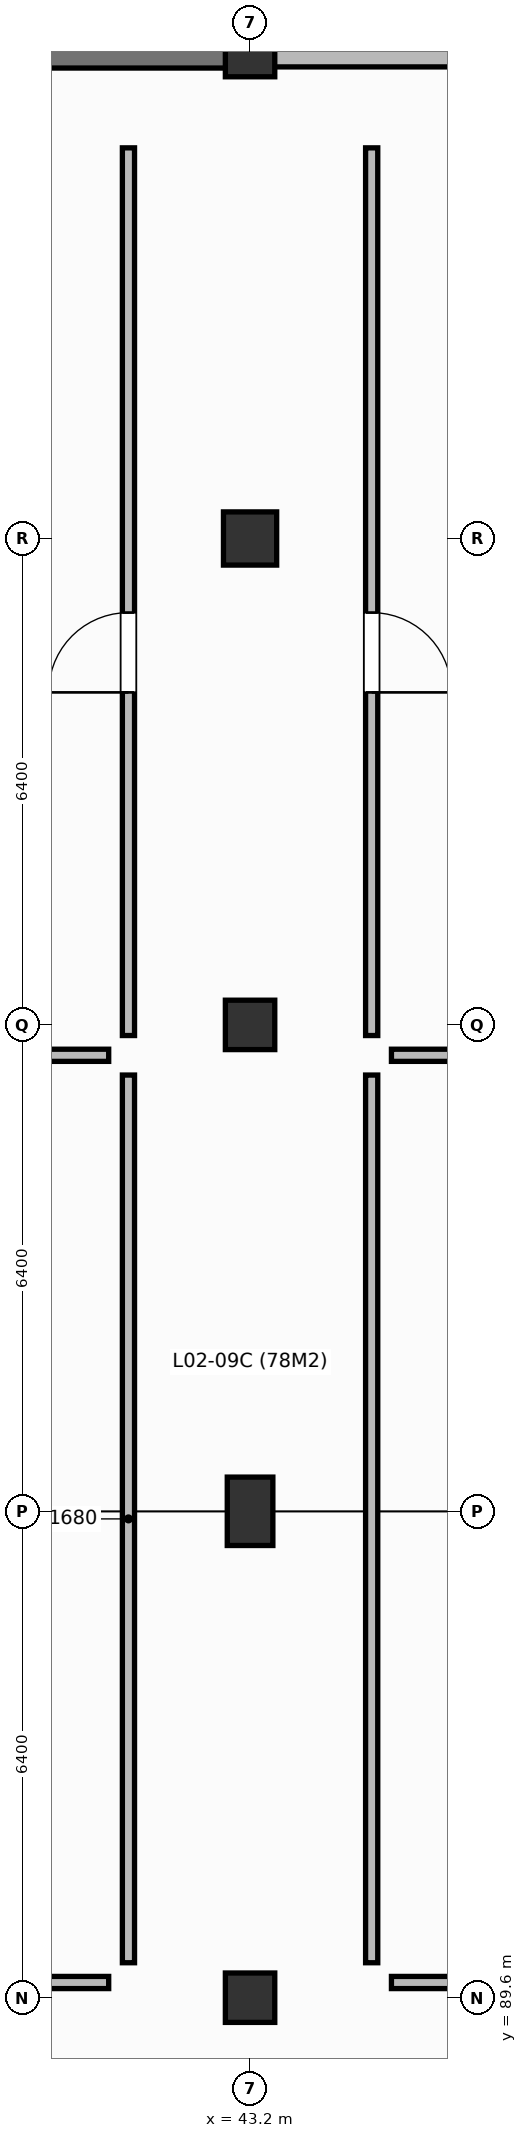
"""IFC4 building model, lengths in metres.
Left out: names, types, materials, properties, quantities, classifications, styles, units other than length and angle.
Written with IfcOpenShell. Run it as: python <this file> out.ifc"""

import sys

from ifc_helpers import new_model, si_unit, direction, frame, frame_2d, origin, origin_2d, place, context, subcontext, project, spatial, rectangle, extrude, element, fill, save


model = new_model("IFC4")
c1 = context("Model", 3, precision=1e-05, world=origin(), true_north=direction((0.0, 1.0)))
c2 = subcontext(c1, "Body", "Model", "MODEL_VIEW")
j1 = project(units=[si_unit("LENGTHUNIT", "METRE"), si_unit("PLANEANGLEUNIT", "RADIAN")], contexts=[c1])
p1 = place(None, origin())
s1 = spatial("IfcSite", under=j1, at=p1, CompositionType="ELEMENT")
p2 = place(p1, origin())
s2 = spatial("IfcBuilding", under=s1, at=p2, CompositionType="ELEMENT")
p3 = place(p2, frame((0.0, 0.0, 9.0)))
s3 = spatial("IfcBuildingStorey", under=s2, at=p3, CompositionType="ELEMENT", Elevation=9.0)
p4 = place(p3, frame((43.2, 89.6, 0.0), z_axis=(0.0, 0.0, 1.0), x_axis=(1.0, 0.0, 0.0)))
e1 = element("IfcColumn", 1, at=p4, inside=s3, PredefinedType="COLUMN", context=c2, shape_type="SweptSolid", body=[
    extrude(rectangle(XDim=0.65, YDim=0.65, at=origin_2d()), origin(), (0.0, 0.0, 1.0), 4.2),
])
p5 = place(p3, frame((43.2, 96.0, 0.0), z_axis=(0.0, 0.0, 1.0), x_axis=(1.0, 0.0, 0.0)))
e2 = element("IfcColumn", 2, at=p5, inside=s3, PredefinedType="COLUMN", context=c2, shape_type="SweptSolid", body=[
    extrude(rectangle(XDim=0.6, YDim=0.9, at=origin_2d()), origin(), (0.0, 0.0, 1.0), 4.2),
])
p6 = place(p3, frame((43.2, 102.4, 0.0), z_axis=(0.0, 0.0, 1.0), x_axis=(1.0, 0.0, 0.0)))
e3 = element("IfcColumn", 3, at=p6, inside=s3, PredefinedType="COLUMN", context=c2, shape_type="SweptSolid", body=[
    extrude(rectangle(XDim=0.65, YDim=0.65, at=origin_2d()), origin(), (0.0, 0.0, 1.0), 4.2),
])
p7 = place(p3, frame((43.2, 108.8, 0.0), z_axis=(0.0, 0.0, 1.0), x_axis=(1.0, 0.0, 0.0)))
e4 = element("IfcColumn", 4, at=p7, inside=s3, PredefinedType="COLUMN", context=c2, shape_type="SweptSolid", body=[
    extrude(rectangle(XDim=0.7, YDim=0.7, at=origin_2d()), origin(), (0.0, 0.0, 1.0), 4.2),
])
p8 = place(p3, frame((43.2, 115.2, 0.0), z_axis=(0.0, 0.0, 1.0), x_axis=(1.0, 0.0, 0.0)))
e5 = element("IfcColumn", 5, at=p8, inside=s3, PredefinedType="COLUMN", context=c2, shape_type="SweptSolid", body=[
    extrude(rectangle(XDim=0.65, YDim=0.65, at=origin_2d()), origin(), (0.0, 0.0, 1.0), 4.2),
])
p9 = place(p3, frame((36.0, 115.2, 0.0), z_axis=(0.0, 0.0, 1.0), x_axis=(1.0, 0.0, 0.0)))
e6 = element("IfcWall", 6, at=p9, inside=s3, PredefinedType="STANDARD", context=c2, shape_type="SweptSolid", body=[
    extrude(rectangle(XDim=7.2, YDim=0.42, at=frame_2d((3.6, 0.0))), origin(), (0.0, 0.0, 1.0), 3.84),
])
p10 = place(p9, frame((2.85, 0.0, 0.8)))
e7 = element("IfcOpeningElement", 7, at=p10, cuts=e6, PredefinedType="OPENING", context=c2, shape_type="SweptSolid", body=[
    extrude(rectangle(XDim=1.5, YDim=1.45, at=frame_2d((0.75, 0.725))), frame((0.0, 0.22, 0.0), z_axis=(0.0, -1.0, 0.0), x_axis=(1.0, 0.0, 0.0)), (0.0, 0.0, 1.0), 0.44),
])
p11 = place(p3, frame((43.2, 115.2, 0.0), z_axis=(0.0, 0.0, 1.0), x_axis=(1.0, 0.0, 0.0)))
e8 = element("IfcWall", 8, at=p11, inside=s3, PredefinedType="STANDARD", context=c2, shape_type="SweptSolid", body=[
    extrude(rectangle(XDim=7.2, YDim=0.39, at=frame_2d((3.6, 0.0))), origin(), (0.0, 0.0, 1.0), 3.29),
])
p12 = place(p11, frame((2.7, 0.0, 0.8)))
e9 = element("IfcOpeningElement", 9, at=p12, cuts=e8, PredefinedType="OPENING", context=c2, shape_type="SweptSolid", body=[
    extrude(rectangle(XDim=1.8, YDim=1.45, at=frame_2d((0.9, 0.725))), frame((0.0, 0.205, 0.0), z_axis=(0.0, -1.0, 0.0), x_axis=(1.0, 0.0, 0.0)), (0.0, 0.0, 1.0), 0.41),
])
p13 = place(p3, frame((29.86, 89.8, 0.0), z_axis=(0.0, 0.0, 1.0), x_axis=(1.0, 0.0, 0.0)))
e10 = element("IfcWall", 10, at=p13, inside=s3, PredefinedType="PARTITIONING", context=c2, shape_type="SweptSolid", body=[
    extrude(rectangle(XDim=11.48, YDim=0.16, at=frame_2d((5.74, 0.0))), origin(), (0.0, 0.0, 1.0), 3.165),
])
p14 = place(p13, frame((4.415, 0.0, 0.0)))
e11 = element("IfcOpeningElement", 11, at=p14, cuts=e10, PredefinedType="OPENING", context=c2, shape_type="SweptSolid", body=[
    extrude(rectangle(XDim=1.05, YDim=2.1, at=frame_2d((0.525, 1.05))), frame((0.0, 0.09, 0.0), z_axis=(0.0, -1.0, 0.0), x_axis=(1.0, 0.0, 0.0)), (0.0, 0.0, 1.0), 0.18),
])
p15 = place(p3, frame((41.6, 90.06, 0.0), z_axis=(0.0, 0.0, 1.0), x_axis=(0.0, 1.0, 0.0)))
e12 = element("IfcWall", 12, at=p15, inside=s3, PredefinedType="PARTITIONING", context=c2, shape_type="SweptSolid", body=[
    extrude(rectangle(XDim=11.68, YDim=0.16, at=frame_2d((5.84, 0.0))), origin(), (0.0, 0.0, 1.0), 3.84),
])
p16 = place(p3, frame((41.34, 102.0, 0.0), z_axis=(0.0, 0.0, 1.0), x_axis=(-1.0, 0.0, 0.0)))
e13 = element("IfcWall", 13, at=p16, inside=s3, PredefinedType="PARTITIONING", context=c2, shape_type="SweptSolid", body=[
    extrude(rectangle(XDim=11.48, YDim=0.16, at=frame_2d((5.74, 0.0))), origin(), (0.0, 0.0, 1.0), 3.065),
])
p17 = place(p3, frame((45.06, 89.8, 0.0), z_axis=(0.0, 0.0, 1.0), x_axis=(1.0, 0.0, 0.0)))
e14 = element("IfcWall", 14, at=p17, inside=s3, PredefinedType="PARTITIONING", context=c2, shape_type="SweptSolid", body=[
    extrude(rectangle(XDim=13.08, YDim=0.16, at=frame_2d((6.54, 0.0))), origin(), (0.0, 0.0, 1.0), 3.065),
])
p18 = place(p17, frame((6.015, 0.0, 0.0)))
e15 = element("IfcOpeningElement", 15, at=p18, cuts=e14, PredefinedType="OPENING", context=c2, shape_type="SweptSolid", body=[
    extrude(rectangle(XDim=1.05, YDim=2.1, at=frame_2d((0.525, 1.05))), frame((0.0, 0.09, 0.0), z_axis=(0.0, -1.0, 0.0), x_axis=(1.0, 0.0, 0.0)), (0.0, 0.0, 1.0), 0.18),
])
p19 = place(p3, frame((58.14, 102.0, 0.0), z_axis=(0.0, 0.0, 1.0), x_axis=(-1.0, 0.0, 0.0)))
e16 = element("IfcWall", 16, at=p19, inside=s3, PredefinedType="PARTITIONING", context=c2, shape_type="SweptSolid", body=[
    extrude(rectangle(XDim=13.08, YDim=0.16, at=frame_2d((6.54, 0.0))), origin(), (0.0, 0.0, 1.0), 3.015),
])
p20 = place(p3, frame((44.8, 101.74, 0.0), z_axis=(0.0, 0.0, 1.0), x_axis=(0.0, -1.0, 0.0)))
e17 = element("IfcWall", 17, at=p20, inside=s3, PredefinedType="PARTITIONING", context=c2, shape_type="SweptSolid", body=[
    extrude(rectangle(XDim=11.68, YDim=0.16, at=frame_2d((5.84, 0.0))), origin(), (0.0, 0.0, 1.0), 3.84),
])
p21 = place(p3, frame((44.8, 113.94, 0.0), z_axis=(0.0, 0.0, 1.0), x_axis=(0.0, -1.0, 0.0)))
e18 = element("IfcWall", 18, at=p21, inside=s3, PredefinedType="PARTITIONING", context=c2, shape_type="SweptSolid", body=[
    extrude(rectangle(XDim=11.68, YDim=0.16, at=frame_2d((5.84, 0.0))), origin(), (0.0, 0.0, 1.0), 3.84),
])
p22 = place(p21, frame((6.115, 0.0, 0.0)))
e19 = element("IfcOpeningElement", 19, at=p22, cuts=e18, PredefinedType="OPENING", context=c2, shape_type="SweptSolid", body=[
    extrude(rectangle(XDim=1.05, YDim=2.1, at=frame_2d((0.525, 1.05))), frame((0.0, 0.09, 0.0), z_axis=(0.0, -1.0, 0.0), x_axis=(1.0, 0.0, 0.0)), (0.0, 0.0, 1.0), 0.18),
])
p23 = place(p3, frame((41.6, 102.26, 0.0), z_axis=(0.0, 0.0, 1.0), x_axis=(0.0, 1.0, 0.0)))
e20 = element("IfcWall", 20, at=p23, inside=s3, PredefinedType="PARTITIONING", context=c2, shape_type="SweptSolid", body=[
    extrude(rectangle(XDim=11.68, YDim=0.16, at=frame_2d((5.84, 0.0))), origin(), (0.0, 0.0, 1.0), 3.84),
])
p24 = place(p23, frame((4.515, 0.0, 0.0)))
e21 = element("IfcOpeningElement", 21, at=p24, cuts=e20, PredefinedType="OPENING", context=c2, shape_type="SweptSolid", body=[
    extrude(rectangle(XDim=1.05, YDim=2.1, at=frame_2d((0.525, 1.05))), frame((0.0, 0.09, 0.0), z_axis=(0.0, -1.0, 0.0), x_axis=(1.0, 0.0, 0.0)), (0.0, 0.0, 1.0), 0.18),
])
p25 = place(p22, origin())
e22 = element("IfcDoor", 22, at=p25, inside=s3, OperationType="SINGLE_SWING_RIGHT", PredefinedType="DOOR", context=c2, shape_type="SweptSolid", body=[
    extrude(rectangle(XDim=1.05, YDim=2.1, at=frame_2d((0.525, 1.05))), frame((0.0, 0.025, 0.0), z_axis=(0.0, -1.0, 0.0), x_axis=(1.0, 0.0, 0.0)), (0.0, 0.0, 1.0), 0.05),
])
fill(e19, e22)
p26 = place(p24, origin())
e23 = element("IfcDoor", 23, at=p26, inside=s3, OperationType="SINGLE_SWING_LEFT", PredefinedType="DOOR", context=c2, shape_type="SweptSolid", body=[
    extrude(rectangle(XDim=1.05, YDim=2.1, at=frame_2d((0.525, 1.05))), frame((0.0, 0.025, 0.0), z_axis=(0.0, -1.0, 0.0), x_axis=(1.0, 0.0, 0.0)), (0.0, 0.0, 1.0), 0.05),
])
fill(e21, e23)
save(model, sys.argv[1])
